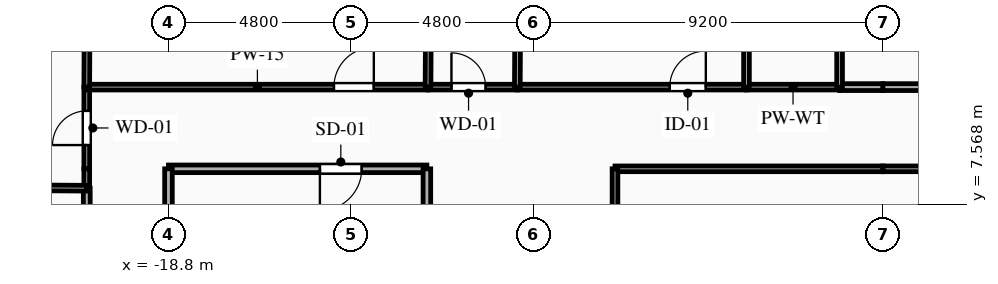
"""IFC4 building model, lengths in metres.
Left out: names, types, materials, properties, quantities, classifications, styles, units other than length and angle.
Written with IfcOpenShell. Run it as: python <this file> out.ifc"""

import sys

from ifc_helpers import new_model, si_unit, direction, frame, frame_2d, origin, place, context, subcontext, project, spatial, rectangle, extrude, element, fill, save


model = new_model("IFC4")
c1 = context("Model", 3, precision=1e-05, world=origin(), true_north=direction((0.0, 1.0)))
c2 = subcontext(c1, "Body", "Model", "MODEL_VIEW")
j1 = project(units=[si_unit("LENGTHUNIT", "METRE"), si_unit("PLANEANGLEUNIT", "RADIAN")], contexts=[c1])
p1 = place(None, origin())
s1 = spatial("IfcSite", under=j1, at=p1, CompositionType="ELEMENT")
p2 = place(p1, origin())
s2 = spatial("IfcBuilding", under=s1, at=p2, CompositionType="ELEMENT")
p3 = place(p2, frame((0.0, 0.0, 209.8)))
s3 = spatial("IfcBuildingStorey", under=s2, at=p3, CompositionType="ELEMENT", Elevation=209.8)
p4 = place(p3, frame((-12.0, 8.5, 0.0), z_axis=(0.0, 0.0, 1.0), x_axis=(-1.0, 0.0, 0.0)))
e1 = element("IfcWall", 1, at=p4, inside=s3, PredefinedType="PARTITIONING", context=c2, shape_type="SweptSolid", body=[
    extrude(rectangle(XDim=6.8, YDim=0.2, at=frame_2d((3.4, 0.0))), origin(), (0.0, 0.0, 1.0), 3.04),
])
p5 = place(p4, frame((1.715, 0.0, 0.0)))
e2 = element("IfcOpeningElement", 2, at=p5, cuts=e1, PredefinedType="OPENING", context=c2, shape_type="SweptSolid", body=[
    extrude(rectangle(XDim=1.1, YDim=2.15, at=frame_2d((0.55, 1.075))), frame((0.0, 0.11, 0.0), z_axis=(0.0, -1.0, 0.0), x_axis=(1.0, 0.0, 0.0)), (0.0, 0.0, 1.0), 0.22),
])
p6 = place(p3, frame((-18.8, 8.5, 0.0), z_axis=(0.0, 0.0, 1.0), x_axis=(0.0, -1.0, 0.0)))
e3 = element("IfcWall", 3, at=p6, inside=s3, PredefinedType="PARTITIONING", context=c2, shape_type="SweptSolid", body=[
    extrude(rectangle(XDim=2.9, YDim=0.2, at=frame_2d((1.45, 0.0))), origin(), (0.0, 0.0, 1.0), 2.665),
])
p7 = place(p3, frame((-12.0, 5.6, 0.0), z_axis=(0.0, 0.0, 1.0), x_axis=(0.0, 1.0, 0.0)))
e4 = element("IfcWall", 4, at=p7, inside=s3, PredefinedType="PARTITIONING", context=c2, shape_type="SweptSolid", body=[
    extrude(rectangle(XDim=2.9, YDim=0.2, at=frame_2d((1.45, 0.0))), origin(), (0.0, 0.0, 1.0), 3.04),
])
p8 = place(p3, frame((-20.95, 8.5, 0.0), z_axis=(0.0, 0.0, 1.0), x_axis=(0.0, 1.0, 0.0)))
e5 = element("IfcWall", 5, at=p8, inside=s3, PredefinedType="PARTITIONING", context=c2, shape_type="SweptSolid", body=[
    extrude(rectangle(XDim=2.15, YDim=0.15, at=frame_2d((1.075, 0.0))), origin(), (0.0, 0.0, 1.0), 3.04),
])
p9 = place(p8, frame((0.625, 0.0, 0.0)))
e6 = element("IfcOpeningElement", 6, at=p9, cuts=e5, PredefinedType="OPENING", context=c2, shape_type="SweptSolid", body=[
    extrude(rectangle(XDim=0.9, YDim=2.1, at=frame_2d((0.45, 1.05))), frame((0.0, 0.085, 0.0), z_axis=(0.0, -1.0, 0.0), x_axis=(1.0, 0.0, 0.0)), (0.0, 0.0, 1.0), 0.17),
])
p10 = place(p3, frame((-20.95, 10.65, 0.0), z_axis=(0.0, 0.0, 1.0), x_axis=(1.0, 0.0, 0.0)))
e7 = element("IfcWall", 7, at=p10, inside=s3, PredefinedType="PARTITIONING", context=c2, shape_type="SweptSolid", body=[
    extrude(rectangle(XDim=8.98, YDim=0.15, at=frame_2d((4.49, 0.0))), origin(), (0.0, 0.0, 1.0), 3.04),
])
p11 = place(p10, frame((6.504, 0.0, 0.0)))
e8 = element("IfcOpeningElement", 8, at=p11, cuts=e7, PredefinedType="OPENING", context=c2, shape_type="SweptSolid", body=[
    extrude(rectangle(XDim=1.05, YDim=2.15, at=frame_2d((0.525, 1.075))), frame((0.0, 0.085, 0.0), z_axis=(0.0, -1.0, 0.0), x_axis=(1.0, 0.0, 0.0)), (0.0, 0.0, 1.0), 0.17),
])
p12 = place(p3, frame((-11.97, 10.65, 0.0), z_axis=(0.0, 0.0, 1.0), x_axis=(1.0, 0.0, 0.0)))
e9 = element("IfcWall", 9, at=p12, inside=s3, PredefinedType="PLUMBINGWALL", context=c2, shape_type="SweptSolid", body=[
    extrude(rectangle(XDim=2.35, YDim=0.15, at=frame_2d((1.175, 0.0))), origin(), (0.0, 0.0, 1.0), 3.04),
])
p13 = place(p12, frame((0.616, 0.0, 0.0)))
e10 = element("IfcOpeningElement", 10, at=p13, cuts=e9, PredefinedType="OPENING", context=c2, shape_type="SweptSolid", body=[
    extrude(rectangle(XDim=0.9, YDim=2.1, at=frame_2d((0.45, 1.05))), frame((0.0, 0.085, 0.0), z_axis=(0.0, -1.0, 0.0), x_axis=(1.0, 0.0, 0.0)), (0.0, 0.0, 1.0), 0.17),
])
p14 = place(p3, frame((-9.62, 10.65, 0.0), z_axis=(0.0, 0.0, 1.0), x_axis=(1.0, 0.0, 0.0)))
e11 = element("IfcWall", 11, at=p14, inside=s3, PredefinedType="PARTITIONING", context=c2, shape_type="SweptSolid", body=[
    extrude(rectangle(XDim=6.03, YDim=0.15, at=frame_2d((3.015, 0.0))), origin(), (0.0, 0.0, 1.0), 3.04),
])
p15 = place(p14, frame((4.01, 0.0, 0.0)))
e12 = element("IfcOpeningElement", 12, at=p15, cuts=e11, PredefinedType="OPENING", context=c2, shape_type="SweptSolid", body=[
    extrude(rectangle(XDim=0.95, YDim=2.1, at=frame_2d((0.475, 1.05))), frame((0.0, 0.085, 0.0), z_axis=(0.0, -1.0, 0.0), x_axis=(1.0, 0.0, 0.0)), (0.0, 0.0, 1.0), 0.17),
])
p16 = place(p3, frame((-1.14, 10.65, 0.0), z_axis=(0.0, 0.0, 1.0), x_axis=(1.0, 0.0, 0.0)))
e13 = element("IfcWall", 13, at=p16, inside=s3, PredefinedType="PARTITIONING", context=c2, shape_type="SweptSolid", body=[
    extrude(rectangle(XDim=1.14, YDim=0.18, at=frame_2d((0.57, 0.0))), origin(), (0.0, 0.0, 1.0), 3.04),
])
p17 = place(p3, frame((-3.59, 10.65, 0.0), z_axis=(0.0, 0.0, 1.0), x_axis=(1.0, 0.0, 0.0)))
e14 = element("IfcWall", 14, at=p17, inside=s3, PredefinedType="PLUMBINGWALL", context=c2, shape_type="SweptSolid", body=[
    extrude(rectangle(XDim=2.45, YDim=0.15, at=frame_2d((1.225, 0.0))), origin(), (0.0, 0.0, 1.0), 3.04),
])
p18 = place(p3, frame((0.0, 8.5, 0.0), z_axis=(0.0, 0.0, 1.0), x_axis=(-1.0, 0.0, 0.0)))
e15 = element("IfcWall", 15, at=p18, inside=s3, PredefinedType="PARTITIONING", context=c2, shape_type="SweptSolid", body=[
    extrude(rectangle(XDim=7.05, YDim=0.15, at=frame_2d((3.525, 0.0))), origin(), (0.0, 0.0, 1.0), 3.04),
])
p19 = place(p3, frame((0.0, 10.65, 0.0), z_axis=(0.0, 0.0, 1.0), x_axis=(1.0, 0.0, 0.0)))
e16 = element("IfcWall", 16, at=p19, inside=s3, PredefinedType="PARTITIONING", context=c2, shape_type="SweptSolid", body=[
    extrude(rectangle(XDim=4.79, YDim=0.18, at=frame_2d((2.395, 0.0))), origin(), (0.0, 0.0, 1.0), 3.04),
])
p20 = place(p19, frame((2.224, 0.0, 0.0)))
e17 = element("IfcOpeningElement", 17, at=p20, cuts=e16, PredefinedType="OPENING", context=c2, shape_type="SweptSolid", body=[
    extrude(rectangle(XDim=1.0, YDim=2.15, at=frame_2d((0.5, 1.075))), frame((0.0, 0.1, 0.0), z_axis=(0.0, -1.0, 0.0), x_axis=(1.0, 0.0, 0.0)), (0.0, 0.0, 1.0), 0.2),
])
p21 = place(p3, frame((7.05, 8.5, 0.0), z_axis=(0.0, 0.0, 1.0), x_axis=(-1.0, 0.0, 0.0)))
e18 = element("IfcWall", 18, at=p21, inside=s3, PredefinedType="PARTITIONING", context=c2, shape_type="SweptSolid", body=[
    extrude(rectangle(XDim=7.05, YDim=0.15, at=frame_2d((3.525, 0.0))), origin(), (0.0, 0.0, 1.0), 3.04),
])
p22 = place(p3, frame((-20.95, -1.306, 0.0), z_axis=(0.0, 0.0, 1.0), x_axis=(0.0, 1.0, 0.0)))
e19 = element("IfcWall", 19, at=p22, inside=s3, PredefinedType="PARTITIONING", context=c2, shape_type="SweptSolid", body=[
    extrude(rectangle(XDim=9.296, YDim=0.18, at=frame_2d((4.648, 0.0))), origin(), (0.0, 0.0, 1.0), 3.04),
])
p23 = place(p22, frame((1.472, 0.0, 0.0)))
e20 = element("IfcOpeningElement", 20, at=p23, cuts=e19, PredefinedType="OPENING", context=c2, shape_type="SweptSolid", body=[
    extrude(rectangle(XDim=1.0, YDim=2.15, at=frame_2d((0.5, 1.075))), frame((0.0, 0.1, 0.0), z_axis=(0.0, -1.0, 0.0), x_axis=(1.0, 0.0, 0.0)), (0.0, 0.0, 1.0), 0.2),
])
p24 = place(p3, frame((-20.95, 7.99, 0.0), z_axis=(0.0, 0.0, 1.0), x_axis=(0.0, 1.0, 0.0)))
e21 = element("IfcWall", 21, at=p24, inside=s3, PredefinedType="PARTITIONING", context=c2, shape_type="SweptSolid", body=[
    extrude(rectangle(XDim=0.51, YDim=0.15, at=frame_2d((0.255, 0.0))), origin(), (0.0, 0.0, 1.0), 3.04),
])
p25 = place(p3, frame((-7.05, 8.5, 0.0), z_axis=(0.0, 0.0, 1.0), x_axis=(0.0, -1.0, 0.0)))
e22 = element("IfcWall", 22, at=p25, inside=s3, PredefinedType="PARTITIONING", context=c2, shape_type="SweptSolid", body=[
    extrude(rectangle(XDim=9.3, YDim=0.15, at=frame_2d((4.65, 0.0))), origin(), (0.0, 0.0, 1.0), 3.04),
])
p26 = place(p3, frame((-27.419, 8.034, 0.0), z_axis=(0.0, 0.0, 1.0), x_axis=(0.999976928608, -0.006792808784, 0.0)))
e23 = element("IfcWall", 23, at=p26, inside=s3, PredefinedType="PARTITIONING", context=c2, shape_type="SweptSolid", body=[
    extrude(rectangle(XDim=6.469, YDim=0.15, at=frame_2d((3.235, 0.0))), origin(), (0.0, 0.0, 1.0), 3.04),
])
p27 = place(p3, frame((-20.906, 19.662, 0.0), z_axis=(0.0, 0.0, 1.0), x_axis=(-0.004876272857, -0.999988110911, 0.0)))
e24 = element("IfcWall", 24, at=p27, inside=s3, PredefinedType="PARTITIONING", context=c2, shape_type="SweptSolid", body=[
    extrude(rectangle(XDim=9.012, YDim=0.15, at=frame_2d((4.506, 0.0))), origin(), (0.0, 0.0, 1.0), 2.665),
])
p28 = place(p3, frame((-11.926, 18.718, 0.0), z_axis=(0.0, 0.0, 1.0), x_axis=(-0.005446707114, -0.999985166581, 0.0)))
e25 = element("IfcWall", 25, at=p28, inside=s3, PredefinedType="PLUMBINGWALL", context=c2, shape_type="SweptSolid", body=[
    extrude(rectangle(XDim=8.068, YDim=0.15, at=frame_2d((4.034, 0.0))), origin(), (0.0, 0.0, 1.0), 3.04),
])
p29 = place(p3, frame((-9.576, 18.471, 0.0), z_axis=(0.0, 0.0, 1.0), x_axis=(-0.005618590299, -0.999984215597, 0.0)))
e26 = element("IfcWall", 26, at=p29, inside=s3, PredefinedType="PLUMBINGWALL", context=c2, shape_type="SweptSolid", body=[
    extrude(rectangle(XDim=7.822, YDim=0.15, at=frame_2d((3.911, 0.0))), origin(), (0.0, 0.0, 1.0), 3.04),
])
for number, where, z_axis, x_axis in (
    (27, (-3.59, 12.8, 0.0), (0.0, 0.0, 1.0), (0.0, -1.0, 0.0)),
    (28, (-1.14, 10.65, 0.0), (0.0, 0.0, 1.0), (0.0, 1.0, 0.0)),
):
    element("IfcWall", number, at=place(p3, frame(where, z_axis=z_axis, x_axis=x_axis)), inside=s3, PredefinedType="PLUMBINGWALL", context=c2, shape_type="SweptSolid", body=[
        extrude(rectangle(XDim=2.15, YDim=0.15, at=frame_2d((1.075, 0.0))), origin(), (0.0, 0.0, 1.0), 3.04),
    ])
p30 = place(p5, origin())
e29 = element("IfcDoor", 29, at=p30, inside=s3, OperationType="SINGLE_SWING_RIGHT", PredefinedType="DOOR", context=c2, shape_type="SweptSolid", body=[
    extrude(rectangle(XDim=1.1, YDim=2.15, at=frame_2d((0.55, 1.075))), frame((0.0, 0.025, 0.0), z_axis=(0.0, -1.0, 0.0), x_axis=(1.0, 0.0, 0.0)), (0.0, 0.0, 1.0), 0.05),
])
fill(e2, e29)
p31 = place(p9, origin())
e30 = element("IfcDoor", 30, at=p31, inside=s3, OperationType="SINGLE_SWING_LEFT", PredefinedType="DOOR", context=c2, shape_type="SweptSolid", body=[
    extrude(rectangle(XDim=0.9, YDim=2.1, at=frame_2d((0.45, 1.05))), frame((0.0, 0.025, 0.0), z_axis=(0.0, -1.0, 0.0), x_axis=(1.0, 0.0, 0.0)), (0.0, 0.0, 1.0), 0.05),
])
fill(e6, e30)
p32 = place(p11, origin())
e31 = element("IfcDoor", 31, at=p32, inside=s3, OperationType="SINGLE_SWING_RIGHT", PredefinedType="DOOR", context=c2, shape_type="SweptSolid", body=[
    extrude(rectangle(XDim=1.05, YDim=2.15, at=frame_2d((0.525, 1.075))), frame((0.0, 0.025, 0.0), z_axis=(0.0, -1.0, 0.0), x_axis=(1.0, 0.0, 0.0)), (0.0, 0.0, 1.0), 0.05),
])
fill(e8, e31)
p33 = place(p13, origin())
e32 = element("IfcDoor", 32, at=p33, inside=s3, OperationType="SINGLE_SWING_LEFT", PredefinedType="DOOR", context=c2, shape_type="SweptSolid", body=[
    extrude(rectangle(XDim=0.9, YDim=2.1, at=frame_2d((0.45, 1.05))), frame((0.0, 0.025, 0.0), z_axis=(0.0, -1.0, 0.0), x_axis=(1.0, 0.0, 0.0)), (0.0, 0.0, 1.0), 0.05),
])
fill(e10, e32)
p34 = place(p15, origin())
e33 = element("IfcDoor", 33, at=p34, inside=s3, OperationType="SINGLE_SWING_RIGHT", PredefinedType="DOOR", context=c2, shape_type="SweptSolid", body=[
    extrude(rectangle(XDim=0.95, YDim=2.1, at=frame_2d((0.475, 1.05))), frame((0.0, 0.025, 0.0), z_axis=(0.0, -1.0, 0.0), x_axis=(1.0, 0.0, 0.0)), (0.0, 0.0, 1.0), 0.05),
])
fill(e12, e33)
save(model, sys.argv[1])
